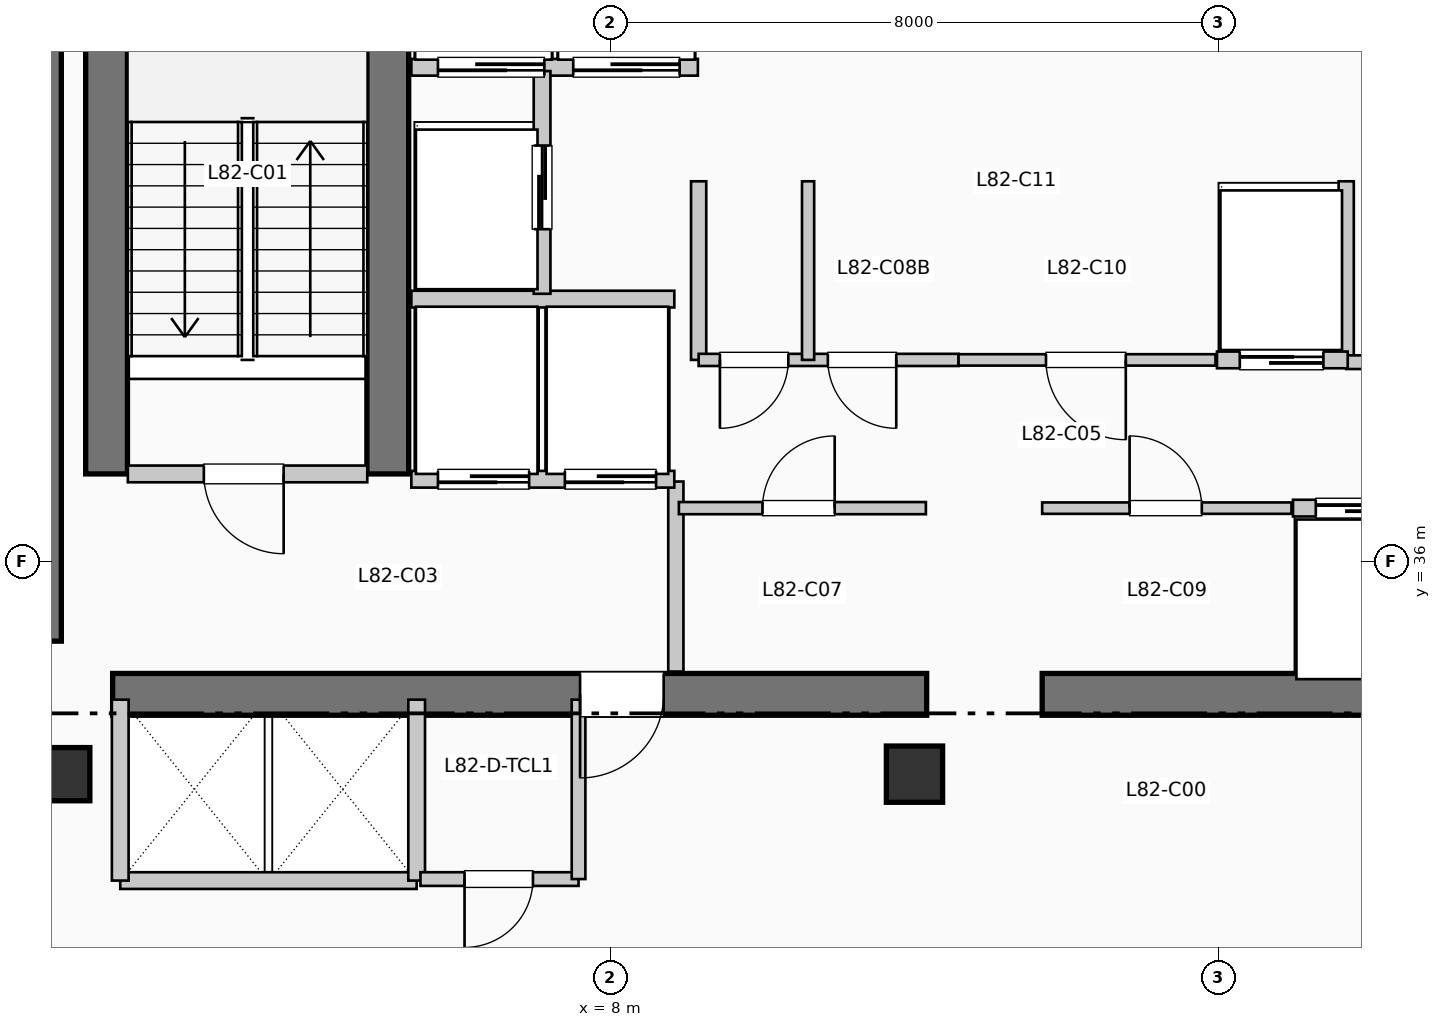
"""IFC4 building model, lengths in metres.
Left out: names, types, materials, properties, quantities, classifications, styles, units other than length and angle.
Written with IfcOpenShell. Run it as: python <this file> out.ifc"""

import sys

from ifc_helpers import new_model, si_unit, direction, frame, frame_2d, origin, origin_2d, place, context, subcontext, project, spatial, rectangle, extrude, element, fill, save


model = new_model("IFC4")
c1 = context("Model", 3, precision=1e-05, world=origin(), true_north=direction((0.0, 1.0)))
c2 = subcontext(c1, "Body", "Model", "MODEL_VIEW")
j1 = project(units=[si_unit("LENGTHUNIT", "METRE"), si_unit("PLANEANGLEUNIT", "RADIAN")], contexts=[c1])
p1 = place(None, origin())
s1 = spatial("IfcSite", under=j1, at=p1, CompositionType="ELEMENT")
p2 = place(p1, origin())
s2 = spatial("IfcBuilding", under=s1, at=p2, CompositionType="ELEMENT")
p3 = place(p2, frame((0.0, 0.0, 335.61)))
s3 = spatial("IfcBuildingStorey", under=s2, at=p3, CompositionType="ELEMENT", Elevation=335.61)
p4 = place(p3, frame((0.5, 34.95, 0.0), z_axis=(0.0, 0.0, 1.0), x_axis=(0.0, 1.0, 0.0)))
e1 = element("IfcWall", 1, at=p4, inside=s3, PredefinedType="SHEAR", context=c2, shape_type="SweptSolid", body=[
    extrude(rectangle(XDim=7.9, YDim=0.55, at=frame_2d((3.95, 0.0))), origin(), (0.0, 0.0, 1.0), 3.96),
])
p5 = place(p3, frame((1.45, 34.25, 0.0), z_axis=(0.0, 0.0, 1.0), x_axis=(1.0, 0.0, 0.0)))
e2 = element("IfcWall", 2, at=p5, inside=s3, PredefinedType="SHEAR", context=c2, shape_type="SweptSolid", body=[
    extrude(rectangle(XDim=10.71, YDim=0.55, at=frame_2d((5.355, 0.0))), origin(), (0.0, 0.0, 1.0), 3.96),
])
p6 = place(p5, frame((7.25, 0.0, 0.0), z_axis=(0.0, 0.0, 1.0), x_axis=(-1.0, 0.0, 0.0)))
e3 = element("IfcOpeningElement", 3, at=p6, cuts=e2, PredefinedType="OPENING", context=c2, shape_type="SweptSolid", body=[
    extrude(rectangle(XDim=1.1, YDim=2.15, at=frame_2d((0.55, 1.075))), frame((0.0, 0.285, 0.0), z_axis=(0.0, -1.0, 0.0), x_axis=(1.0, 0.0, 0.0)), (0.0, 0.0, 1.0), 0.57),
])
p7 = place(p3, frame((13.68, 34.25, 0.0), z_axis=(0.0, 0.0, 1.0), x_axis=(1.0, 0.0, 0.0)))
e4 = element("IfcWall", 4, at=p7, inside=s3, PredefinedType="SHEAR", context=c2, shape_type="SweptSolid", body=[
    extrude(rectangle(XDim=6.12, YDim=0.55, at=frame_2d((3.06, 0.0))), origin(), (0.0, 0.0, 1.0), 3.96),
])
for number, where, z_axis, x_axis in (
    (5, (1.37, 37.15, 0.0), (0.0, 0.0, 1.0), (0.0, 1.0, 0.0)),
    (6, (5.07, 37.15, 0.0), (0.0, 0.0, 1.0), (0.0, 1.0, 0.0)),
):
    element("IfcWall", number, at=place(p3, frame(where, z_axis=z_axis, x_axis=x_axis)), inside=s3, PredefinedType="SHEAR", context=c2, shape_type="SweptSolid", body=[
        extrude(rectangle(XDim=7.89, YDim=0.55, at=frame_2d((3.945, 0.0))), origin(), (0.0, 0.0, 1.0), 3.96),
    ])
p8 = place(p3, frame((0.8, 33.2, 0.0), z_axis=(0.0, 0.0, 1.0), x_axis=(1.0, 0.0, 0.0)))
e7 = element("IfcColumn", 7, at=p8, inside=s3, PredefinedType="COLUMN", context=c2, shape_type="SweptSolid", body=[
    extrude(rectangle(XDim=0.7, YDim=0.7, at=origin_2d()), origin(), (0.0, 0.0, 1.0), 3.96),
])
p9 = place(p3, frame((12.0, 33.2, 0.0), z_axis=(0.0, 0.0, 1.0), x_axis=(1.0, 0.0, 0.0)))
e8 = element("IfcColumn", 8, at=p9, inside=s3, PredefinedType="COLUMN", context=c2, shape_type="SweptSolid", body=[
    extrude(rectangle(XDim=0.74, YDim=0.74, at=origin_2d()), origin(), (0.0, 0.0, 1.0), 3.96),
])
p10 = place(p3, frame((1.65, 37.15, 0.0), z_axis=(0.0, 0.0, 1.0), x_axis=(1.0, 0.0, 0.0)))
e9 = element("IfcWall", 9, at=p10, inside=s3, PredefinedType="PARTITIONING", context=c2, shape_type="SweptSolid", body=[
    extrude(rectangle(XDim=3.15, YDim=0.22, at=frame_2d((1.575, 0.0))), origin(), (0.0, 0.0, 1.0), 3.74),
])
p11 = place(p10, frame((2.05, 0.0, 0.0), z_axis=(0.0, 0.0, 1.0), x_axis=(-1.0, 0.0, 0.0)))
e10 = element("IfcOpeningElement", 10, at=p11, cuts=e9, PredefinedType="OPENING", context=c2, shape_type="SweptSolid", body=[
    extrude(rectangle(XDim=1.05, YDim=2.15, at=frame_2d((0.525, 1.075))), frame((0.0, 0.12, 0.0), z_axis=(0.0, -1.0, 0.0), x_axis=(1.0, 0.0, 0.0)), (0.0, 0.0, 1.0), 0.24),
])
p12 = place(p3, frame((8.86, 34.55, 0.0), z_axis=(0.0, 0.0, 1.0), x_axis=(0.0, 1.0, 0.0)))
e11 = element("IfcWall", 11, at=p12, inside=s3, PredefinedType="PARTITIONING", context=c2, shape_type="SweptSolid", body=[
    extrude(rectangle(XDim=2.5, YDim=0.2, at=frame_2d((1.25, 0.0))), origin(), (0.0, 0.0, 1.0), 3.74),
])
p13 = place(p3, frame((5.38, 37.08, 0.0), z_axis=(0.0, 0.0, 1.0), x_axis=(1.0, 0.0, 0.0)))
e12 = element("IfcWall", 12, at=p13, inside=s3, PredefinedType="PARTITIONING", context=c2, shape_type="SweptSolid", body=[
    extrude(rectangle(XDim=3.46, YDim=0.22, at=frame_2d((1.73, 0.0))), origin(), (0.0, 0.0, 1.0), 3.74),
])
p14 = place(p13, frame((1.55, 0.0, 0.0), z_axis=(0.0, 0.0, 1.0), x_axis=(-1.0, 0.0, 0.0)))
e13 = element("IfcOpeningElement", 13, at=p14, cuts=e12, PredefinedType="OPENING", context=c2, shape_type="SweptSolid", body=[
    extrude(rectangle(XDim=1.2, YDim=2.2, at=frame_2d((0.6, 1.1))), frame((0.0, 0.12, 0.0), z_axis=(0.0, -1.0, 0.0), x_axis=(1.0, 0.0, 0.0)), (0.0, 0.0, 1.0), 0.24),
])
p15 = place(p13, frame((3.22, 0.0, 0.0), z_axis=(0.0, 0.0, 1.0), x_axis=(-1.0, 0.0, 0.0)))
e14 = element("IfcOpeningElement", 14, at=p15, cuts=e12, PredefinedType="OPENING", context=c2, shape_type="SweptSolid", body=[
    extrude(rectangle(XDim=1.2, YDim=2.2, at=frame_2d((0.6, 1.1))), frame((0.0, 0.12, 0.0), z_axis=(0.0, -1.0, 0.0), x_axis=(1.0, 0.0, 0.0)), (0.0, 0.0, 1.0), 0.24),
])
p16 = place(p3, frame((5.38, 39.45, 0.0), z_axis=(0.0, 0.0, 1.0), x_axis=(1.0, 0.0, 0.0)))
e15 = element("IfcWall", 15, at=p16, inside=s3, PredefinedType="PARTITIONING", context=c2, shape_type="SweptSolid", body=[
    extrude(rectangle(XDim=3.46, YDim=0.22, at=frame_2d((1.73, 0.0))), origin(), (0.0, 0.0, 1.0), 3.74),
])
p17 = place(p3, frame((5.38, 42.5, 0.0), z_axis=(0.0, 0.0, 1.0), x_axis=(1.0, 0.0, 0.0)))
e16 = element("IfcWall", 16, at=p17, inside=s3, PredefinedType="PARTITIONING", context=c2, shape_type="SweptSolid", body=[
    extrude(rectangle(XDim=3.77, YDim=0.22, at=frame_2d((1.885, 0.0))), origin(), (0.0, 0.0, 1.0), 3.74),
])
p18 = place(p17, frame((1.75, 0.0, 0.0), z_axis=(0.0, 0.0, 1.0), x_axis=(-1.0, 0.0, 0.0)))
e17 = element("IfcOpeningElement", 17, at=p18, cuts=e16, PredefinedType="OPENING", context=c2, shape_type="SweptSolid", body=[
    extrude(rectangle(XDim=1.4, YDim=2.2, at=frame_2d((0.7, 1.1))), frame((0.0, 0.12, 0.0), z_axis=(0.0, -1.0, 0.0), x_axis=(1.0, 0.0, 0.0)), (0.0, 0.0, 1.0), 0.24),
])
p19 = place(p17, frame((3.53, 0.0, 0.0), z_axis=(0.0, 0.0, 1.0), x_axis=(-1.0, 0.0, 0.0)))
e18 = element("IfcOpeningElement", 18, at=p19, cuts=e16, PredefinedType="OPENING", context=c2, shape_type="SweptSolid", body=[
    extrude(rectangle(XDim=1.4, YDim=2.2, at=frame_2d((0.7, 1.1))), frame((0.0, 0.12, 0.0), z_axis=(0.0, -1.0, 0.0), x_axis=(1.0, 0.0, 0.0)), (0.0, 0.0, 1.0), 0.24),
])
p20 = place(p3, frame((7.1, 39.52, 0.0), z_axis=(0.0, 0.0, 1.0), x_axis=(0.0, 1.0, 0.0)))
e19 = element("IfcWall", 19, at=p20, inside=s3, PredefinedType="PARTITIONING", context=c2, shape_type="SweptSolid", body=[
    extrude(rectangle(XDim=2.93, YDim=0.22, at=frame_2d((1.465, 0.0))), origin(), (0.0, 0.0, 1.0), 3.74),
])
p21 = place(p20, frame((0.85, 0.0, 0.0)))
e20 = element("IfcOpeningElement", 20, at=p21, cuts=e19, PredefinedType="OPENING", context=c2, shape_type="SweptSolid", body=[
    extrude(rectangle(XDim=1.1, YDim=2.2, at=frame_2d((0.55, 1.1))), frame((0.0, 0.12, 0.0), z_axis=(0.0, -1.0, 0.0), x_axis=(1.0, 0.0, 0.0)), (0.0, 0.0, 1.0), 0.24),
])
p22 = place(p3, frame((1.55, 31.8, 0.0), z_axis=(0.0, 0.0, 1.0), x_axis=(1.0, 0.0, 0.0)))
e21 = element("IfcWall", 21, at=p22, inside=s3, PredefinedType="PARTITIONING", context=c2, shape_type="SweptSolid", body=[
    extrude(rectangle(XDim=3.9, YDim=0.22, at=frame_2d((1.95, 0.0))), origin(), (0.0, 0.0, 1.0), 3.74),
])
for number, where, z_axis, x_axis in (
    (22, (1.55, 31.8, 0.0), (0.0, 0.0, 1.0), (0.0, 1.0, 0.0)),
    (23, (5.45, 31.8, 0.0), (0.0, 0.0, 1.0), (0.0, 1.0, 0.0)),
):
    element("IfcWall", number, at=place(p3, frame(where, z_axis=z_axis, x_axis=x_axis)), inside=s3, PredefinedType="PARTITIONING", context=c2, shape_type="SweptSolid", body=[
        extrude(rectangle(XDim=2.38, YDim=0.22, at=frame_2d((1.19, 0.0))), origin(), (0.0, 0.0, 1.0), 3.74),
    ])
for number, where, z_axis, x_axis in (
    (24, (9.16, 38.65, 0.0), (0.0, 0.0, 1.0), (0.0, 1.0, 0.0)),
    (25, (17.68, 38.65, 0.0), (0.0, 0.0, 1.0), (0.0, 1.0, 0.0)),
):
    element("IfcWall", number, at=place(p3, frame(where, z_axis=z_axis, x_axis=x_axis)), inside=s3, PredefinedType="PARTITIONING", context=c2, shape_type="SweptSolid", body=[
        extrude(rectangle(XDim=2.35, YDim=0.2, at=frame_2d((1.175, 0.0))), origin(), (0.0, 0.0, 1.0), 3.74),
    ])
p23 = place(p3, frame((17.68, 38.62, 0.0), z_axis=(0.0, 0.0, 1.0), x_axis=(1.0, 0.0, 0.0)))
e26 = element("IfcWall", 26, at=p23, inside=s3, PredefinedType="PARTITIONING", context=c2, shape_type="SweptSolid", body=[
    extrude(rectangle(XDim=1.84, YDim=0.18, at=frame_2d((0.92, 0.0))), origin(), (0.0, 0.0, 1.0), 3.74),
])
p24 = place(p23, frame((0.24, 0.0, 0.0)))
e27 = element("IfcOpeningElement", 27, at=p24, cuts=e26, PredefinedType="OPENING", context=c2, shape_type="SweptSolid", body=[
    extrude(rectangle(XDim=0.92, YDim=2.1, at=frame_2d((0.46, 1.05))), frame((0.0, 0.1, 0.0), z_axis=(0.0, -1.0, 0.0), x_axis=(1.0, 0.0, 0.0)), (0.0, 0.0, 1.0), 0.2),
])
p25 = place(p3, frame((5.5, 31.82, 0.0), z_axis=(0.0, 0.0, 1.0), x_axis=(1.0, 0.0, 0.0)))
e28 = element("IfcWall", 28, at=p25, inside=s3, PredefinedType="PLUMBINGWALL", context=c2, shape_type="SweptSolid", body=[
    extrude(rectangle(XDim=2.08, YDim=0.18, at=frame_2d((1.04, 0.0))), origin(), (0.0, 0.0, 1.0), 3.74),
])
p26 = place(p25, frame((1.48, 0.0, 0.0), z_axis=(0.0, 0.0, 1.0), x_axis=(-1.0, 0.0, 0.0)))
e29 = element("IfcOpeningElement", 29, at=p26, cuts=e28, PredefinedType="OPENING", context=c2, shape_type="SweptSolid", body=[
    extrude(rectangle(XDim=0.9, YDim=2.1, at=frame_2d((0.45, 1.05))), frame((0.0, 0.1, 0.0), z_axis=(0.0, -1.0, 0.0), x_axis=(1.0, 0.0, 0.0)), (0.0, 0.0, 1.0), 0.2),
])
p27 = place(p3, frame((7.58, 31.82, 0.0), z_axis=(0.0, 0.0, 1.0), x_axis=(0.0, 1.0, 0.0)))
e30 = element("IfcWall", 30, at=p27, inside=s3, PredefinedType="PLUMBINGWALL", context=c2, shape_type="SweptSolid", body=[
    extrude(rectangle(XDim=2.36, YDim=0.18, at=frame_2d((1.18, 0.0))), origin(), (0.0, 0.0, 1.0), 3.74),
])
p28 = place(p3, frame((8.9, 36.7, 0.0), z_axis=(0.0, 0.0, 1.0), x_axis=(1.0, 0.0, 0.0)))
e31 = element("IfcWall", 31, at=p28, inside=s3, PredefinedType="PARTITIONING", context=c2, shape_type="SweptSolid", body=[
    extrude(rectangle(XDim=3.25, YDim=0.16, at=frame_2d((1.625, 0.0))), origin(), (0.0, 0.0, 1.0), 3.74),
])
p29 = place(p28, frame((1.1, 0.0, 0.0)))
e32 = element("IfcOpeningElement", 32, at=p29, cuts=e31, PredefinedType="OPENING", context=c2, shape_type="SweptSolid", body=[
    extrude(rectangle(XDim=0.95, YDim=2.15, at=frame_2d((0.475, 1.075))), frame((0.0, 0.09, 0.0), z_axis=(0.0, -1.0, 0.0), x_axis=(1.0, 0.0, 0.0)), (0.0, 0.0, 1.0), 0.18),
])
p30 = place(p3, frame((9.16, 38.65, 0.0), z_axis=(0.0, 0.0, 1.0), x_axis=(1.0, 0.0, 0.0)))
e33 = element("IfcWall", 33, at=p30, inside=s3, PredefinedType="PARTITIONING", context=c2, shape_type="SweptSolid", body=[
    extrude(rectangle(XDim=3.42, YDim=0.16, at=frame_2d((1.71, 0.0))), origin(), (0.0, 0.0, 1.0), 3.74),
])
p31 = place(p30, frame((1.18, 0.0, 0.0), z_axis=(0.0, 0.0, 1.0), x_axis=(-1.0, 0.0, 0.0)))
e34 = element("IfcOpeningElement", 34, at=p31, cuts=e33, PredefinedType="OPENING", context=c2, shape_type="SweptSolid", body=[
    extrude(rectangle(XDim=0.9, YDim=2.15, at=frame_2d((0.45, 1.075))), frame((0.0, 0.09, 0.0), z_axis=(0.0, -1.0, 0.0), x_axis=(1.0, 0.0, 0.0)), (0.0, 0.0, 1.0), 0.18),
])
p32 = place(p30, frame((2.6, 0.0, 0.0), z_axis=(0.0, 0.0, 1.0), x_axis=(-1.0, 0.0, 0.0)))
e35 = element("IfcOpeningElement", 35, at=p32, cuts=e33, PredefinedType="OPENING", context=c2, shape_type="SweptSolid", body=[
    extrude(rectangle(XDim=0.9, YDim=2.15, at=frame_2d((0.45, 1.075))), frame((0.0, 0.09, 0.0), z_axis=(0.0, -1.0, 0.0), x_axis=(1.0, 0.0, 0.0)), (0.0, 0.0, 1.0), 0.18),
])
p33 = place(p3, frame((10.6, 38.65, 0.0), z_axis=(0.0, 0.0, 1.0), x_axis=(0.0, 1.0, 0.0)))
e36 = element("IfcWall", 36, at=p33, inside=s3, PredefinedType="PARTITIONING", context=c2, shape_type="SweptSolid", body=[
    extrude(rectangle(XDim=2.35, YDim=0.16, at=frame_2d((1.175, 0.0))), origin(), (0.0, 0.0, 1.0), 3.74),
])
p34 = place(p3, frame((13.68, 36.7, 0.0), z_axis=(0.0, 0.0, 1.0), x_axis=(1.0, 0.0, 0.0)))
e37 = element("IfcWall", 37, at=p34, inside=s3, PredefinedType="PARTITIONING", context=c2, shape_type="SweptSolid", body=[
    extrude(rectangle(XDim=3.28, YDim=0.15, at=frame_2d((1.64, 0.0))), origin(), (0.0, 0.0, 1.0), 3.74),
])
p35 = place(p34, frame((1.15, 0.0, 0.0)))
e38 = element("IfcOpeningElement", 38, at=p35, cuts=e37, PredefinedType="OPENING", context=c2, shape_type="SweptSolid", body=[
    extrude(rectangle(XDim=0.95, YDim=2.15, at=frame_2d((0.475, 1.075))), frame((0.0, 0.085, 0.0), z_axis=(0.0, -1.0, 0.0), x_axis=(1.0, 0.0, 0.0)), (0.0, 0.0, 1.0), 0.17),
])
p36 = place(p3, frame((12.58, 38.65, 0.0), z_axis=(0.0, 0.0, 1.0), x_axis=(1.0, 0.0, 0.0)))
e39 = element("IfcWall", 39, at=p36, inside=s3, PredefinedType="PARTITIONING", context=c2, shape_type="SweptSolid", body=[
    extrude(rectangle(XDim=3.38, YDim=0.15, at=frame_2d((1.69, 0.0))), origin(), (0.0, 0.0, 1.0), 3.74),
])
p37 = place(p36, frame((2.2, 0.0, 0.0), z_axis=(0.0, 0.0, 1.0), x_axis=(-1.0, 0.0, 0.0)))
e40 = element("IfcOpeningElement", 40, at=p37, cuts=e39, PredefinedType="OPENING", context=c2, shape_type="SweptSolid", body=[
    extrude(rectangle(XDim=1.05, YDim=2.15, at=frame_2d((0.525, 1.075))), frame((0.0, 0.085, 0.0), z_axis=(0.0, -1.0, 0.0), x_axis=(1.0, 0.0, 0.0)), (0.0, 0.0, 1.0), 0.17),
])
p38 = place(p3, frame((16.98, 36.7, 0.0), z_axis=(0.0, 0.0, 1.0), x_axis=(1.0, 0.0, 0.0)))
e41 = element("IfcWall", 41, at=p38, inside=s3, PredefinedType="PARTITIONING", context=c2, shape_type="SweptSolid", body=[
    extrude(rectangle(XDim=1.7, YDim=0.22, at=frame_2d((0.85, 0.0))), origin(), (0.0, 0.0, 1.0), 3.74),
])
p39 = place(p38, frame((0.3, 0.0, 0.0)))
e42 = element("IfcOpeningElement", 42, at=p39, cuts=e41, PredefinedType="OPENING", context=c2, shape_type="SweptSolid", body=[
    extrude(rectangle(XDim=1.1, YDim=2.2, at=frame_2d((0.55, 1.1))), frame((0.0, 0.12, 0.0), z_axis=(0.0, -1.0, 0.0), x_axis=(1.0, 0.0, 0.0)), (0.0, 0.0, 1.0), 0.24),
])
p40 = place(p3, frame((15.98, 38.65, 0.0), z_axis=(0.0, 0.0, 1.0), x_axis=(1.0, 0.0, 0.0)))
e43 = element("IfcWall", 43, at=p40, inside=s3, PredefinedType="PARTITIONING", context=c2, shape_type="SweptSolid", body=[
    extrude(rectangle(XDim=1.72, YDim=0.22, at=frame_2d((0.86, 0.0))), origin(), (0.0, 0.0, 1.0), 3.74),
])
p41 = place(p40, frame((0.3, 0.0, 0.0)))
e44 = element("IfcOpeningElement", 44, at=p41, cuts=e43, PredefinedType="OPENING", context=c2, shape_type="SweptSolid", body=[
    extrude(rectangle(XDim=1.1, YDim=2.2, at=frame_2d((0.55, 1.1))), frame((0.0, 0.12, 0.0), z_axis=(0.0, -1.0, 0.0), x_axis=(1.0, 0.0, 0.0)), (0.0, 0.0, 1.0), 0.24),
])
p42 = place(p11, origin())
e45 = element("IfcDoor", 45, at=p42, inside=s3, OperationType="SINGLE_SWING_RIGHT", PredefinedType="DOOR", context=c2, shape_type="SweptSolid", body=[
    extrude(rectangle(XDim=1.05, YDim=2.15, at=frame_2d((0.525, 1.075))), frame((0.0, 0.025, 0.0), z_axis=(0.0, -1.0, 0.0), x_axis=(1.0, 0.0, 0.0)), (0.0, 0.0, 1.0), 0.05),
])
fill(e10, e45)
p43 = place(p6, origin())
e46 = element("IfcDoor", 46, at=p43, inside=s3, OperationType="SINGLE_SWING_LEFT", PredefinedType="DOOR", context=c2, shape_type="SweptSolid", body=[
    extrude(rectangle(XDim=1.1, YDim=2.15, at=frame_2d((0.55, 1.075))), frame((0.0, 0.025, 0.0), z_axis=(0.0, -1.0, 0.0), x_axis=(1.0, 0.0, 0.0)), (0.0, 0.0, 1.0), 0.05),
])
fill(e3, e46)
p44 = place(p14, origin())
e47 = element("IfcDoor", 47, at=p44, inside=s3, OperationType="SLIDING_TO_RIGHT", PredefinedType="DOOR", context=c2, shape_type="SweptSolid", body=[
    extrude(rectangle(XDim=1.2, YDim=2.2, at=frame_2d((0.6, 1.1))), frame((0.0, 0.025, 0.0), z_axis=(0.0, -1.0, 0.0), x_axis=(1.0, 0.0, 0.0)), (0.0, 0.0, 1.0), 0.05),
])
fill(e13, e47)
p45 = place(p15, origin())
e48 = element("IfcDoor", 48, at=p45, inside=s3, OperationType="SLIDING_TO_RIGHT", PredefinedType="DOOR", context=c2, shape_type="SweptSolid", body=[
    extrude(rectangle(XDim=1.2, YDim=2.2, at=frame_2d((0.6, 1.1))), frame((0.0, 0.025, 0.0), z_axis=(0.0, -1.0, 0.0), x_axis=(1.0, 0.0, 0.0)), (0.0, 0.0, 1.0), 0.05),
])
fill(e14, e48)
p46 = place(p18, origin())
e49 = element("IfcDoor", 49, at=p46, inside=s3, OperationType="SLIDING_TO_LEFT", PredefinedType="DOOR", context=c2, shape_type="SweptSolid", body=[
    extrude(rectangle(XDim=1.4, YDim=2.2, at=frame_2d((0.7, 1.1))), frame((0.0, 0.025, 0.0), z_axis=(0.0, -1.0, 0.0), x_axis=(1.0, 0.0, 0.0)), (0.0, 0.0, 1.0), 0.05),
])
fill(e17, e49)
p47 = place(p19, origin())
e50 = element("IfcDoor", 50, at=p47, inside=s3, OperationType="SLIDING_TO_LEFT", PredefinedType="DOOR", context=c2, shape_type="SweptSolid", body=[
    extrude(rectangle(XDim=1.4, YDim=2.2, at=frame_2d((0.7, 1.1))), frame((0.0, 0.025, 0.0), z_axis=(0.0, -1.0, 0.0), x_axis=(1.0, 0.0, 0.0)), (0.0, 0.0, 1.0), 0.05),
])
fill(e18, e50)
p48 = place(p21, origin())
e51 = element("IfcDoor", 51, at=p48, inside=s3, OperationType="SLIDING_TO_LEFT", PredefinedType="DOOR", context=c2, shape_type="SweptSolid", body=[
    extrude(rectangle(XDim=1.1, YDim=2.2, at=frame_2d((0.55, 1.1))), frame((0.0, 0.025, 0.0), z_axis=(0.0, -1.0, 0.0), x_axis=(1.0, 0.0, 0.0)), (0.0, 0.0, 1.0), 0.05),
])
fill(e20, e51)
p49 = place(p26, origin())
e52 = element("IfcDoor", 52, at=p49, inside=s3, OperationType="SINGLE_SWING_LEFT", PredefinedType="DOOR", context=c2, shape_type="SweptSolid", body=[
    extrude(rectangle(XDim=0.9, YDim=2.1, at=frame_2d((0.45, 1.05))), frame((0.0, 0.025, 0.0), z_axis=(0.0, -1.0, 0.0), x_axis=(1.0, 0.0, 0.0)), (0.0, 0.0, 1.0), 0.05),
])
fill(e29, e52)
p50 = place(p29, origin())
e53 = element("IfcDoor", 53, at=p50, inside=s3, OperationType="SINGLE_SWING_RIGHT", PredefinedType="DOOR", context=c2, shape_type="SweptSolid", body=[
    extrude(rectangle(XDim=0.95, YDim=2.15, at=frame_2d((0.475, 1.075))), frame((0.0, 0.025, 0.0), z_axis=(0.0, -1.0, 0.0), x_axis=(1.0, 0.0, 0.0)), (0.0, 0.0, 1.0), 0.05),
])
fill(e32, e53)
p51 = place(p31, origin())
e54 = element("IfcDoor", 54, at=p51, inside=s3, OperationType="SINGLE_SWING_LEFT", PredefinedType="DOOR", context=c2, shape_type="SweptSolid", body=[
    extrude(rectangle(XDim=0.9, YDim=2.15, at=frame_2d((0.45, 1.075))), frame((0.0, 0.025, 0.0), z_axis=(0.0, -1.0, 0.0), x_axis=(1.0, 0.0, 0.0)), (0.0, 0.0, 1.0), 0.05),
])
fill(e34, e54)
p52 = place(p32, origin())
e55 = element("IfcDoor", 55, at=p52, inside=s3, OperationType="SINGLE_SWING_RIGHT", PredefinedType="DOOR", context=c2, shape_type="SweptSolid", body=[
    extrude(rectangle(XDim=0.9, YDim=2.15, at=frame_2d((0.45, 1.075))), frame((0.0, 0.025, 0.0), z_axis=(0.0, -1.0, 0.0), x_axis=(1.0, 0.0, 0.0)), (0.0, 0.0, 1.0), 0.05),
])
fill(e35, e55)
p53 = place(p35, origin())
e56 = element("IfcDoor", 56, at=p53, inside=s3, OperationType="SINGLE_SWING_LEFT", PredefinedType="DOOR", context=c2, shape_type="SweptSolid", body=[
    extrude(rectangle(XDim=0.95, YDim=2.15, at=frame_2d((0.475, 1.075))), frame((0.0, 0.025, 0.0), z_axis=(0.0, -1.0, 0.0), x_axis=(1.0, 0.0, 0.0)), (0.0, 0.0, 1.0), 0.05),
])
fill(e38, e56)
p54 = place(p37, origin())
e57 = element("IfcDoor", 57, at=p54, inside=s3, OperationType="SINGLE_SWING_RIGHT", PredefinedType="DOOR", context=c2, shape_type="SweptSolid", body=[
    extrude(rectangle(XDim=1.05, YDim=2.15, at=frame_2d((0.525, 1.075))), frame((0.0, 0.025, 0.0), z_axis=(0.0, -1.0, 0.0), x_axis=(1.0, 0.0, 0.0)), (0.0, 0.0, 1.0), 0.05),
])
fill(e40, e57)
p55 = place(p39, origin())
e58 = element("IfcDoor", 58, at=p55, inside=s3, OperationType="SLIDING_TO_LEFT", PredefinedType="DOOR", context=c2, shape_type="SweptSolid", body=[
    extrude(rectangle(XDim=1.1, YDim=2.2, at=frame_2d((0.55, 1.1))), frame((0.0, 0.025, 0.0), z_axis=(0.0, -1.0, 0.0), x_axis=(1.0, 0.0, 0.0)), (0.0, 0.0, 1.0), 0.05),
])
fill(e42, e58)
p56 = place(p41, origin())
e59 = element("IfcDoor", 59, at=p56, inside=s3, OperationType="SLIDING_TO_LEFT", PredefinedType="DOOR", context=c2, shape_type="SweptSolid", body=[
    extrude(rectangle(XDim=1.1, YDim=2.2, at=frame_2d((0.55, 1.1))), frame((0.0, 0.025, 0.0), z_axis=(0.0, -1.0, 0.0), x_axis=(1.0, 0.0, 0.0)), (0.0, 0.0, 1.0), 0.05),
])
fill(e44, e59)
save(model, sys.argv[1])
